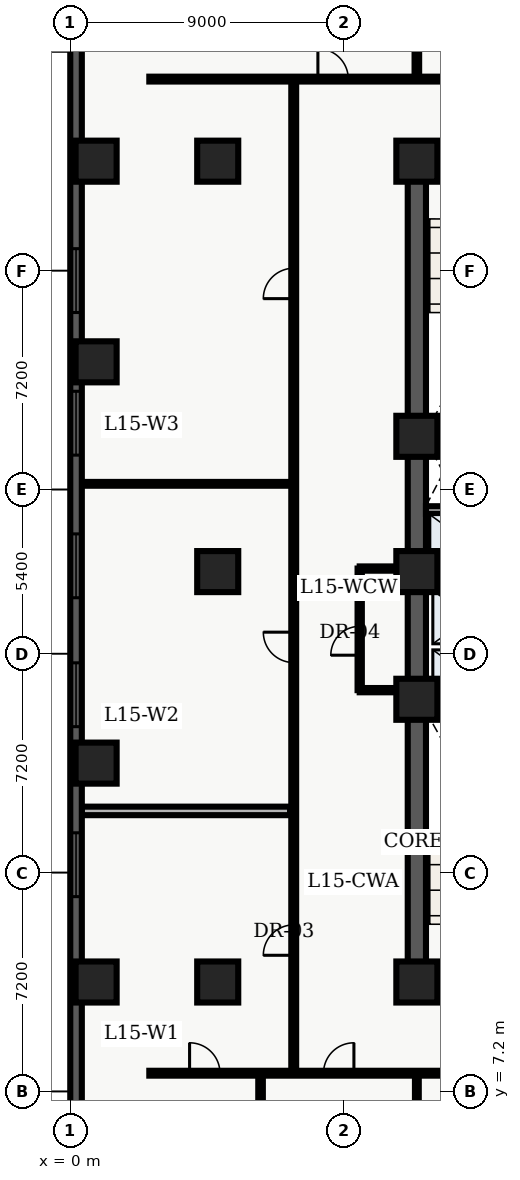
"""IFC4 building model, lengths in metres.
Left out: names, types, materials, properties, quantities, classifications, styles, units other than length and angle.
Written with IfcOpenShell. Run it as: python <this file> out.ifc"""

import sys

from ifc_helpers import new_model, entity, si_unit, converted_unit, direction, frame, origin_with_axes, origin_2d_with_axis, place, context, subcontext, project, spatial, polyline, rectangle, outline, extrude, element, fill, save


model = new_model("IFC4")
c1 = context("Model", 3, precision=1e-05, world=origin_with_axes(), true_north=direction((0.0, 1.0)))
c2 = subcontext(c1, "Body", "Model", "MODEL_VIEW")
j1 = project(units=[si_unit("LENGTHUNIT", "METRE"), converted_unit("PLANEANGLEUNIT", "DEGREE", entity("IfcPlaneAngleMeasure", 0.017), si_unit("PLANEANGLEUNIT", "RADIAN"), dimensions=[0, 0, 0, 0, 0, 0, 0])], contexts=[c1])
p1 = place(None, origin_with_axes())
s1 = spatial("IfcSite", under=j1, at=p1, CompositionType="ELEMENT")
p2 = place(p1, origin_with_axes())
s2 = spatial("IfcBuilding", under=s1, at=p2, CompositionType="ELEMENT")
p3 = place(p2, frame((0.0, 0.0, 63.9), z_axis=(0.0, 0.0, 1.0), x_axis=(1.0, 0.0, 0.0)))
s3 = spatial("IfcBuildingStorey", under=s2, at=p3, CompositionType="ELEMENT", Elevation=63.9)
p4 = place(p3, frame((11.4, 10.8, 0.0), z_axis=(0.0, 0.0, 1.0), x_axis=(0.0, 1.0, 0.0)))
e1 = element("IfcWall", 1, at=p4, inside=s3, PredefinedType="SHEAR", context=c2, shape_type="SweptSolid", body=[
    extrude(outline(polyline([(0.0, -0.3), (27.0, -0.3), (27.0, 0.3), (0.0, 0.3), (0.0, -0.3)])), origin_with_axes(), (0.0, 0.0, 1.0), 3.66),
])
p5 = place(p3, frame((11.4, 10.8, 0.0), z_axis=(0.0, 0.0, 1.0), x_axis=(1.0, 0.0, 0.0)))
e2 = element("IfcWall", 2, at=p5, inside=s3, PredefinedType="SHEAR", context=c2, shape_type="SweptSolid", body=[
    extrude(outline(polyline([(0.0, -0.3), (7.2, -0.3), (7.2, 0.3), (0.0, 0.3), (0.0, -0.3)])), origin_with_axes(), (0.0, 0.0, 1.0), 3.66),
])
p6 = place(p5, frame((2.625, 0.0, 0.0), z_axis=(0.0, 0.0, 1.0), x_axis=(1.0, 0.0, 0.0)))
e3 = element("IfcOpeningElement", 3, at=p6, cuts=e2, PredefinedType="OPENING", context=c2, shape_type="SweptSolid", body=[
    extrude(rectangle(XDim=1.05, YDim=0.62, at=origin_2d_with_axis()), origin_with_axes(), (0.0, 0.0, 1.0), 2.15),
])
p7 = place(p3, frame((11.4, 37.8, 0.0), z_axis=(0.0, 0.0, 1.0), x_axis=(1.0, 0.0, 0.0)))
e4 = element("IfcWall", 4, at=p7, inside=s3, PredefinedType="SHEAR", context=c2, shape_type="SweptSolid", body=[
    extrude(outline(polyline([(0.0, -0.3), (7.2, -0.3), (7.2, 0.3), (0.0, 0.3), (0.0, -0.3)])), origin_with_axes(), (0.0, 0.0, 1.0), 3.66),
])
p8 = place(p7, frame((2.625, 0.0, 0.0), z_axis=(0.0, 0.0, 1.0), x_axis=(1.0, 0.0, 0.0)))
e5 = element("IfcOpeningElement", 5, at=p8, cuts=e4, PredefinedType="OPENING", context=c2, shape_type="SweptSolid", body=[
    extrude(rectangle(XDim=1.05, YDim=0.62, at=origin_2d_with_axis()), origin_with_axes(), (0.0, 0.0, 1.0), 2.15),
])
for number, where, z_axis, x_axis in (
    (6, (11.7, 19.825, 0.0), (0.0, 0.0, 1.0), (1.0, 0.0, 0.0)),
    (7, (11.7, 28.775, 0.0), (0.0, 0.0, 1.0), (1.0, 0.0, 0.0)),
):
    element("IfcWall", number, at=place(p3, frame(where, z_axis=z_axis, x_axis=x_axis)), inside=s3, PredefinedType="SHEAR", context=c2, shape_type="SweptSolid", body=[
        extrude(outline(polyline([(0.0, -0.125), (6.6, -0.125), (6.6, 0.125), (0.0, 0.125), (0.0, -0.125)])), origin_with_axes(), (0.0, 0.0, 1.0), 3.66),
    ])
p9 = place(p3, frame((11.7, 24.1, 0.0), z_axis=(0.0, 0.0, 1.0), x_axis=(1.0, 0.0, 0.0)))
e8 = element("IfcWall", 8, at=p9, inside=s3, PredefinedType="SOLIDWALL", context=c2, shape_type="SweptSolid", body=[
    extrude(outline(polyline([(0.0, -0.125), (6.6, -0.125), (6.6, 0.125), (0.0, 0.125), (0.0, -0.125)])), origin_with_axes(), (0.0, 0.0, 1.0), 2.7),
])
p10 = place(p9, frame((3.75, 0.0, 0.0), z_axis=(0.0, 0.0, 1.0), x_axis=(1.0, 0.0, 0.0)))
e9 = element("IfcOpeningElement", 9, at=p10, cuts=e8, PredefinedType="OPENING", context=c2, shape_type="SweptSolid", body=[
    extrude(rectangle(XDim=0.9, YDim=0.27, at=origin_2d_with_axis()), origin_with_axes(), (0.0, 0.0, 1.0), 2.15),
])
p11 = place(p3, frame((11.7, 26.325, 0.0), z_axis=(0.0, 0.0, 1.0), x_axis=(1.0, 0.0, 0.0)))
e10 = element("IfcWall", 10, at=p11, inside=s3, PredefinedType="SOLIDWALL", context=c2, shape_type="SweptSolid", body=[
    extrude(outline(polyline([(0.0, -0.125), (6.6, -0.125), (6.6, 0.125), (0.0, 0.125), (0.0, -0.125)])), origin_with_axes(), (0.0, 0.0, 1.0), 2.7),
])
p12 = place(p11, frame((3.5, 0.0, 0.0), z_axis=(0.0, 0.0, 1.0), x_axis=(1.0, 0.0, 0.0)))
e11 = element("IfcOpeningElement", 11, at=p12, cuts=e10, PredefinedType="OPENING", context=c2, shape_type="SweptSolid", body=[
    extrude(rectangle(XDim=0.9, YDim=0.27, at=origin_2d_with_axis()), origin_with_axes(), (0.0, 0.0, 1.0), 2.15),
])
for number, where, z_axis, x_axis in (
    (12, (11.4, 10.8, 0.0), (0.0, 0.0, 1.0), (1.0, 0.0, 0.0)),
    (13, (11.4, 20.1, 0.0), (0.0, 0.0, 1.0), (1.0, 0.0, 0.0)),
    (14, (11.4, 24.3, 0.0), (0.0, 0.0, 1.0), (1.0, 0.0, 0.0)),
    (15, (11.4, 28.75, 0.0), (0.0, 0.0, 1.0), (1.0, 0.0, 0.0)),
    (16, (11.4, 37.8, 0.0), (0.0, 0.0, 1.0), (1.0, 0.0, 0.0)),
    (17, (4.85, 10.8, 0.0), (0.0, 0.0, 1.0), (1.0, 0.0, 0.0)),
    (18, (4.85, 24.3, 0.0), (0.0, 0.0, 1.0), (1.0, 0.0, 0.0)),
    (19, (4.85, 37.8, 0.0), (0.0, 0.0, 1.0), (1.0, 0.0, 0.0)),
    (20, (0.85, 10.8, 0.0), (0.0, 0.0, 1.0), (1.0, 0.0, 0.0)),
    (21, (0.85, 18.0, 0.0), (0.0, 0.0, 1.0), (1.0, 0.0, 0.0)),
    (22, (0.85, 31.2, 0.0), (0.0, 0.0, 1.0), (1.0, 0.0, 0.0)),
    (23, (0.85, 37.8, 0.0), (0.0, 0.0, 1.0), (1.0, 0.0, 0.0)),
):
    element("IfcColumn", number, at=place(p3, frame(where, z_axis=z_axis, x_axis=x_axis)), inside=s3, PredefinedType="COLUMN", context=c2, shape_type="SweptSolid", body=[
        extrude(rectangle(XDim=1.35, YDim=1.35, at=origin_2d_with_axis()), origin_with_axes(), (0.0, 0.0, 1.0), 3.9),
    ])
p13 = place(p3, frame((9.52, 20.4, 0.0), z_axis=(0.0, 0.0, 1.0), x_axis=(0.0, 1.0, 0.0)))
e24 = element("IfcWall", 24, at=p13, inside=s3, PredefinedType="PARTITIONING", context=c2, shape_type="SweptSolid", body=[
    extrude(outline(polyline([(0.0, -0.07), (4.0, -0.07), (4.0, 0.07), (0.0, 0.07), (0.0, -0.07)])), origin_with_axes(), (0.0, 0.0, 1.0), 2.7),
])
p14 = place(p13, frame((1.625, 0.0, 0.0), z_axis=(0.0, 0.0, 1.0), x_axis=(1.0, 0.0, 0.0)))
e25 = element("IfcOpeningElement", 25, at=p14, cuts=e24, PredefinedType="OPENING", context=c2, shape_type="SweptSolid", body=[
    extrude(rectangle(XDim=0.95, YDim=0.16, at=origin_2d_with_axis()), origin_with_axes(), (0.0, 0.0, 1.0), 2.15),
])
for number, where, z_axis, x_axis in (
    (26, (9.52, 20.4, 0.0), (0.0, 0.0, 1.0), (1.0, 0.0, 0.0)),
    (27, (9.52, 24.4, 0.0), (0.0, 0.0, 1.0), (1.0, 0.0, 0.0)),
):
    element("IfcWall", number, at=place(p3, frame(where, z_axis=z_axis, x_axis=x_axis)), inside=s3, PredefinedType="PARTITIONING", context=c2, shape_type="SweptSolid", body=[
        extrude(outline(polyline([(0.0, -0.07), (1.58, -0.07), (1.58, 0.07), (0.0, 0.07), (0.0, -0.07)])), origin_with_axes(), (0.0, 0.0, 1.0), 2.7),
    ])
p15 = place(p3, frame((2.6, 7.8, 0.0), z_axis=(0.0, 0.0, 1.0), x_axis=(1.0, 0.0, 0.0)))
e28 = element("IfcWall", 28, at=p15, inside=s3, PredefinedType="PARTITIONING", context=c2, shape_type="SweptSolid", body=[
    extrude(outline(polyline([(0.0, -0.08), (18.55, -0.08), (18.55, 0.08), (0.0, 0.08), (0.0, -0.08)])), origin_with_axes(), (0.0, 0.0, 1.0), 2.7),
])
p16 = place(p15, frame((1.825, 0.0, 0.0), z_axis=(0.0, 0.0, 1.0), x_axis=(1.0, 0.0, 0.0)))
e29 = element("IfcOpeningElement", 29, at=p16, cuts=e28, PredefinedType="OPENING", context=c2, shape_type="SweptSolid", body=[
    extrude(rectangle(XDim=1.0, YDim=0.18, at=origin_2d_with_axis()), origin_with_axes(), (0.0, 0.0, 1.0), 2.15),
])
p17 = place(p15, frame((6.229, 0.0, 0.0), z_axis=(0.0, 0.0, 1.0), x_axis=(1.0, 0.0, 0.0)))
e30 = element("IfcOpeningElement", 30, at=p17, cuts=e28, PredefinedType="OPENING", context=c2, shape_type="SweptSolid", body=[
    extrude(rectangle(XDim=1.0, YDim=0.18, at=origin_2d_with_axis()), origin_with_axes(), (0.0, 0.0, 1.0), 2.15),
])
p18 = place(p15, frame((10.706, 0.0, 0.0), z_axis=(0.0, 0.0, 1.0), x_axis=(1.0, 0.0, 0.0)))
e31 = element("IfcOpeningElement", 31, at=p18, cuts=e28, PredefinedType="OPENING", context=c2, shape_type="SweptSolid", body=[
    extrude(rectangle(XDim=1.0, YDim=0.18, at=origin_2d_with_axis()), origin_with_axes(), (0.0, 0.0, 1.0), 2.15),
])
p19 = place(p15, frame((15.556, 0.0, 0.0), z_axis=(0.0, 0.0, 1.0), x_axis=(1.0, 0.0, 0.0)))
e32 = element("IfcOpeningElement", 32, at=p19, cuts=e28, PredefinedType="OPENING", context=c2, shape_type="SweptSolid", body=[
    extrude(rectangle(XDim=1.0, YDim=0.18, at=origin_2d_with_axis()), origin_with_axes(), (0.0, 0.0, 1.0), 2.15),
])
p20 = place(p3, frame((2.6, 40.5, 0.0), z_axis=(0.0, 0.0, 1.0), x_axis=(1.0, 0.0, 0.0)))
e33 = element("IfcWall", 33, at=p20, inside=s3, PredefinedType="PARTITIONING", context=c2, shape_type="SweptSolid", body=[
    extrude(outline(polyline([(0.0, -0.08), (18.65, -0.08), (18.65, 0.08), (0.0, 0.08), (0.0, -0.08)])), origin_with_axes(), (0.0, 0.0, 1.0), 2.7),
])
p21 = place(p20, frame((6.045, 0.0, 0.0), z_axis=(0.0, 0.0, 1.0), x_axis=(1.0, 0.0, 0.0)))
e34 = element("IfcOpeningElement", 34, at=p21, cuts=e33, PredefinedType="OPENING", context=c2, shape_type="SweptSolid", body=[
    extrude(rectangle(XDim=1.0, YDim=0.18, at=origin_2d_with_axis()), origin_with_axes(), (0.0, 0.0, 1.0), 2.15),
])
p22 = place(p20, frame((12.61, 0.0, 0.0), z_axis=(0.0, 0.0, 1.0), x_axis=(1.0, 0.0, 0.0)))
e35 = element("IfcOpeningElement", 35, at=p22, cuts=e33, PredefinedType="OPENING", context=c2, shape_type="SweptSolid", body=[
    extrude(rectangle(XDim=1.2, YDim=0.18, at=origin_2d_with_axis()), origin_with_axes(), (0.0, 0.0, 1.0), 2.2),
])
p23 = place(p3, frame((7.35, 7.8, 0.0), z_axis=(0.0, 0.0, 1.0), x_axis=(0.0, 1.0, 0.0)))
e36 = element("IfcWall", 36, at=p23, inside=s3, PredefinedType="PARTITIONING", context=c2, shape_type="SweptSolid", body=[
    extrude(outline(polyline([(0.0, -0.08), (32.7, -0.08), (32.7, 0.08), (0.0, 0.08), (0.0, -0.08)])), origin_with_axes(), (0.0, 0.0, 1.0), 2.7),
])
p24 = place(p23, frame((4.379, 0.0, 0.0), z_axis=(0.0, 0.0, 1.0), x_axis=(1.0, 0.0, 0.0)))
e37 = element("IfcOpeningElement", 37, at=p24, cuts=e36, PredefinedType="OPENING", context=c2, shape_type="SweptSolid", body=[
    extrude(rectangle(XDim=1.0, YDim=0.18, at=origin_2d_with_axis()), origin_with_axes(), (0.0, 0.0, 1.0), 2.15),
])
p25 = place(p23, frame((14.008, 0.0, 0.0), z_axis=(0.0, 0.0, 1.0), x_axis=(1.0, 0.0, 0.0)))
e38 = element("IfcOpeningElement", 38, at=p25, cuts=e36, PredefinedType="OPENING", context=c2, shape_type="SweptSolid", body=[
    extrude(rectangle(XDim=1.0, YDim=0.18, at=origin_2d_with_axis()), origin_with_axes(), (0.0, 0.0, 1.0), 2.15),
])
p26 = place(p23, frame((25.979, 0.0, 0.0), z_axis=(0.0, 0.0, 1.0), x_axis=(1.0, 0.0, 0.0)))
e39 = element("IfcOpeningElement", 39, at=p26, cuts=e36, PredefinedType="OPENING", context=c2, shape_type="SweptSolid", body=[
    extrude(rectangle(XDim=1.0, YDim=0.18, at=origin_2d_with_axis()), origin_with_axes(), (0.0, 0.0, 1.0), 2.15),
])
p27 = place(p3, frame((0.375, 16.428, 0.0), z_axis=(0.0, 0.0, 1.0), x_axis=(1.0, 0.0, 0.0)))
e40 = element("IfcWall", 40, at=p27, inside=s3, PredefinedType="PARTITIONING", context=c2, shape_type="SweptSolid", body=[
    extrude(outline(polyline([(0.0, -0.14), (6.855, -0.14), (6.855, 0.14), (0.0, 0.14), (0.0, -0.14)])), origin_with_axes(), (0.0, 0.0, 1.0), 2.7),
])
p28 = place(p3, frame((0.375, 27.187, 0.0), z_axis=(0.0, 0.0, 1.0), x_axis=(1.0, 0.0, 0.0)))
e41 = element("IfcWall", 41, at=p28, inside=s3, PredefinedType="PARTITIONING", context=c2, shape_type="SweptSolid", body=[
    extrude(outline(polyline([(0.0, -0.062), (6.855, -0.062), (6.855, 0.062), (0.0, 0.062), (0.0, -0.062)])), origin_with_axes(), (0.0, 0.0, 1.0), 2.7),
])
p29 = place(p3, frame((6.259, 0.36, 0.0), z_axis=(0.0, 0.0, 1.0), x_axis=(0.0, 1.0, 0.0)))
e42 = element("IfcWall", 42, at=p29, inside=s3, PredefinedType="PARTITIONING", context=c2, shape_type="SweptSolid", body=[
    extrude(outline(polyline([(0.0, -0.075), (7.34, -0.075), (7.34, 0.075), (0.0, 0.075), (0.0, -0.075)])), origin_with_axes(), (0.0, 0.0, 1.0), 2.7),
])
p30 = place(p3, frame((11.4, 0.36, 0.0), z_axis=(0.0, 0.0, 1.0), x_axis=(0.0, 1.0, 0.0)))
e43 = element("IfcWall", 43, at=p30, inside=s3, PredefinedType="PARTITIONING", context=c2, shape_type="SweptSolid", body=[
    extrude(outline(polyline([(0.0, -0.062), (7.34, -0.062), (7.34, 0.062), (0.0, 0.062), (0.0, -0.062)])), origin_with_axes(), (0.0, 0.0, 1.0), 2.7),
])
p31 = place(p3, frame((11.4, 40.6, 0.0), z_axis=(0.0, 0.0, 1.0), x_axis=(0.0, 1.0, 0.0)))
e44 = element("IfcWall", 44, at=p31, inside=s3, PredefinedType="PARTITIONING", context=c2, shape_type="SweptSolid", body=[
    extrude(outline(polyline([(0.0, -0.075), (7.64, -0.075), (7.64, 0.075), (0.0, 0.075), (0.0, -0.075)])), origin_with_axes(), (0.0, 0.0, 1.0), 2.7),
])
p32 = place(p3, frame((0.19, 2.78, 0.0), z_axis=(0.0, 0.0, 1.0), x_axis=(0.0, 1.0, 0.0)))
e45 = element("IfcWall", 45, at=p32, inside=s3, PredefinedType="SOLIDWALL", context=c2, shape_type="SweptSolid", body=[
    extrude(outline(polyline([(0.0, -0.19), (43.42, -0.19), (43.42, 0.19), (0.0, 0.19), (0.0, -0.19)])), origin_with_axes(), (0.0, 0.0, 1.0), 3.66),
])
p33 = place(p32, frame((2.946, 0.0, 0.45), z_axis=(0.0, 0.0, 1.0), x_axis=(1.0, 0.0, 0.0)))
e46 = element("IfcOpeningElement", 46, at=p33, cuts=e45, PredefinedType="OPENING", context=c2, shape_type="SweptSolid", body=[
    extrude(rectangle(XDim=2.1, YDim=0.4, at=origin_2d_with_axis()), origin_with_axes(), (0.0, 0.0, 1.0), 2.2),
])
p34 = place(p32, frame((11.878, 0.0, 0.45), z_axis=(0.0, 0.0, 1.0), x_axis=(1.0, 0.0, 0.0)))
e47 = element("IfcOpeningElement", 47, at=p34, cuts=e45, PredefinedType="OPENING", context=c2, shape_type="SweptSolid", body=[
    extrude(rectangle(XDim=2.1, YDim=0.4, at=origin_2d_with_axis()), origin_with_axes(), (0.0, 0.0, 1.0), 2.2),
])
p35 = place(p32, frame((17.469, 0.0, 0.45), z_axis=(0.0, 0.0, 1.0), x_axis=(1.0, 0.0, 0.0)))
e48 = element("IfcOpeningElement", 48, at=p35, cuts=e45, PredefinedType="OPENING", context=c2, shape_type="SweptSolid", body=[
    extrude(rectangle(XDim=2.1, YDim=0.4, at=origin_2d_with_axis()), origin_with_axes(), (0.0, 0.0, 1.0), 2.2),
])
p36 = place(p32, frame((21.71, 0.0, 0.45), z_axis=(0.0, 0.0, 1.0), x_axis=(1.0, 0.0, 0.0)))
e49 = element("IfcOpeningElement", 49, at=p36, cuts=e45, PredefinedType="OPENING", context=c2, shape_type="SweptSolid", body=[
    extrude(rectangle(XDim=2.1, YDim=0.4, at=origin_2d_with_axis()), origin_with_axes(), (0.0, 0.0, 1.0), 2.2),
])
p37 = place(p32, frame((26.401, 0.0, 0.45), z_axis=(0.0, 0.0, 1.0), x_axis=(1.0, 0.0, 0.0)))
e50 = element("IfcOpeningElement", 50, at=p37, cuts=e45, PredefinedType="OPENING", context=c2, shape_type="SweptSolid", body=[
    extrude(rectangle(XDim=2.1, YDim=0.4, at=origin_2d_with_axis()), origin_with_axes(), (0.0, 0.0, 1.0), 2.2),
])
p38 = place(p32, frame((31.092, 0.0, 0.45), z_axis=(0.0, 0.0, 1.0), x_axis=(1.0, 0.0, 0.0)))
e51 = element("IfcOpeningElement", 51, at=p38, cuts=e45, PredefinedType="OPENING", context=c2, shape_type="SweptSolid", body=[
    extrude(rectangle(XDim=2.1, YDim=0.4, at=origin_2d_with_axis()), origin_with_axes(), (0.0, 0.0, 1.0), 2.2),
])
p39 = place(p32, frame((40.024, 0.0, 0.45), z_axis=(0.0, 0.0, 1.0), x_axis=(1.0, 0.0, 0.0)))
e52 = element("IfcOpeningElement", 52, at=p39, cuts=e45, PredefinedType="OPENING", context=c2, shape_type="SweptSolid", body=[
    extrude(rectangle(XDim=2.1, YDim=0.4, at=origin_2d_with_axis()), origin_with_axes(), (0.0, 0.0, 1.0), 2.2),
])
p40 = place(p13, frame((1.625, 0.0, 0.0), z_axis=(0.0, 0.0, 1.0), x_axis=(1.0, 0.0, 0.0)))
e53 = element("IfcDoor", 53, at=p40, inside=s3, OperationType="SINGLE_SWING_LEFT", PredefinedType="DOOR", context=c2, shape_type="SweptSolid", body=[
    extrude(rectangle(XDim=0.95, YDim=0.084, at=origin_2d_with_axis()), origin_with_axes(), (0.0, 0.0, 1.0), 2.15),
])
fill(e25, e53)
p41 = place(p23, frame((4.379, 0.0, 0.0), z_axis=(0.0, 0.0, 1.0), x_axis=(1.0, 0.0, 0.0)))
e54 = element("IfcDoor", 54, at=p41, inside=s3, OperationType="SINGLE_SWING_LEFT", PredefinedType="DOOR", context=c2, shape_type="SweptSolid", body=[
    extrude(rectangle(XDim=1.0, YDim=0.09, at=origin_2d_with_axis()), origin_with_axes(), (0.0, 0.0, 1.0), 2.15),
])
fill(e37, e54)
p42 = place(p23, frame((14.008, 0.0, 0.0), z_axis=(0.0, 0.0, 1.0), x_axis=(1.0, 0.0, 0.0)))
e55 = element("IfcDoor", 55, at=p42, inside=s3, OperationType="SINGLE_SWING_RIGHT", PredefinedType="DOOR", context=c2, shape_type="SweptSolid", body=[
    extrude(rectangle(XDim=1.0, YDim=0.09, at=origin_2d_with_axis()), origin_with_axes(), (0.0, 0.0, 1.0), 2.15),
])
fill(e38, e55)
p43 = place(p23, frame((25.979, 0.0, 0.0), z_axis=(0.0, 0.0, 1.0), x_axis=(1.0, 0.0, 0.0)))
e56 = element("IfcDoor", 56, at=p43, inside=s3, OperationType="SINGLE_SWING_LEFT", PredefinedType="DOOR", context=c2, shape_type="SweptSolid", body=[
    extrude(rectangle(XDim=1.0, YDim=0.09, at=origin_2d_with_axis()), origin_with_axes(), (0.0, 0.0, 1.0), 2.15),
])
fill(e39, e56)
p44 = place(p15, frame((1.825, 0.0, 0.0), z_axis=(0.0, 0.0, 1.0), x_axis=(1.0, 0.0, 0.0)))
e57 = element("IfcDoor", 57, at=p44, inside=s3, OperationType="SINGLE_SWING_LEFT", PredefinedType="DOOR", context=c2, shape_type="SweptSolid", body=[
    extrude(rectangle(XDim=1.0, YDim=0.09, at=origin_2d_with_axis()), origin_with_axes(), (0.0, 0.0, 1.0), 2.15),
])
fill(e29, e57)
p45 = place(p15, frame((6.229, 0.0, 0.0), z_axis=(0.0, 0.0, 1.0), x_axis=(1.0, 0.0, 0.0)))
e58 = element("IfcDoor", 58, at=p45, inside=s3, OperationType="SINGLE_SWING_RIGHT", PredefinedType="DOOR", context=c2, shape_type="SweptSolid", body=[
    extrude(rectangle(XDim=1.0, YDim=0.09, at=origin_2d_with_axis()), origin_with_axes(), (0.0, 0.0, 1.0), 2.15),
])
fill(e30, e58)
p46 = place(p20, frame((6.045, 0.0, 0.0), z_axis=(0.0, 0.0, 1.0), x_axis=(1.0, 0.0, 0.0)))
e59 = element("IfcDoor", 59, at=p46, inside=s3, OperationType="SINGLE_SWING_LEFT", PredefinedType="DOOR", context=c2, shape_type="SweptSolid", body=[
    extrude(rectangle(XDim=1.0, YDim=0.09, at=origin_2d_with_axis()), origin_with_axes(), (0.0, 0.0, 1.0), 2.15),
])
fill(e34, e59)
p47 = place(p32, frame((11.878, 0.0, 0.45), z_axis=(0.0, 0.0, 1.0), x_axis=(1.0, 0.0, 0.0)))
e60 = element("IfcWindow", 60, at=p47, inside=s3, PredefinedType="WINDOW", context=c2, shape_type="SweptSolid", body=[
    extrude(rectangle(XDim=2.1, YDim=0.09, at=origin_2d_with_axis()), origin_with_axes(), (0.0, 0.0, 1.0), 2.2),
])
fill(e47, e60)
p48 = place(p32, frame((17.469, 0.0, 0.45), z_axis=(0.0, 0.0, 1.0), x_axis=(1.0, 0.0, 0.0)))
e61 = element("IfcWindow", 61, at=p48, inside=s3, PredefinedType="WINDOW", context=c2, shape_type="SweptSolid", body=[
    extrude(rectangle(XDim=2.1, YDim=0.09, at=origin_2d_with_axis()), origin_with_axes(), (0.0, 0.0, 1.0), 2.2),
])
fill(e48, e61)
p49 = place(p32, frame((21.71, 0.0, 0.45), z_axis=(0.0, 0.0, 1.0), x_axis=(1.0, 0.0, 0.0)))
e62 = element("IfcWindow", 62, at=p49, inside=s3, PredefinedType="WINDOW", context=c2, shape_type="SweptSolid", body=[
    extrude(rectangle(XDim=2.1, YDim=0.09, at=origin_2d_with_axis()), origin_with_axes(), (0.0, 0.0, 1.0), 2.2),
])
fill(e49, e62)
p50 = place(p32, frame((26.401, 0.0, 0.45), z_axis=(0.0, 0.0, 1.0), x_axis=(1.0, 0.0, 0.0)))
e63 = element("IfcWindow", 63, at=p50, inside=s3, PredefinedType="WINDOW", context=c2, shape_type="SweptSolid", body=[
    extrude(rectangle(XDim=2.1, YDim=0.09, at=origin_2d_with_axis()), origin_with_axes(), (0.0, 0.0, 1.0), 2.2),
])
fill(e50, e63)
p51 = place(p32, frame((31.092, 0.0, 0.45), z_axis=(0.0, 0.0, 1.0), x_axis=(1.0, 0.0, 0.0)))
e64 = element("IfcWindow", 64, at=p51, inside=s3, PredefinedType="WINDOW", context=c2, shape_type="SweptSolid", body=[
    extrude(rectangle(XDim=2.1, YDim=0.09, at=origin_2d_with_axis()), origin_with_axes(), (0.0, 0.0, 1.0), 2.2),
])
fill(e51, e64)
save(model, sys.argv[1])
